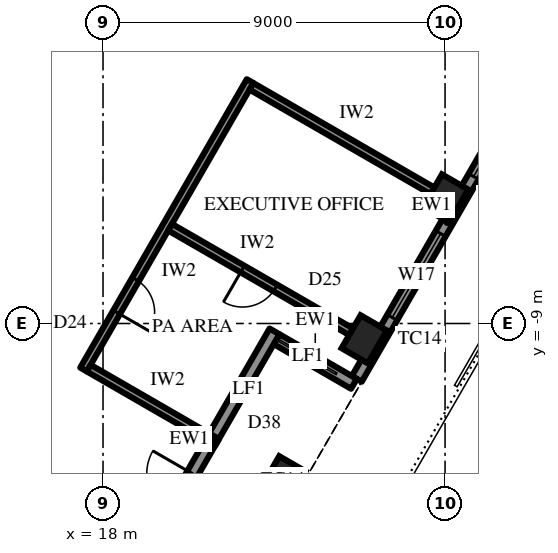
"""IFC4 building model, lengths in metres.
Left out: names, types, materials, properties, quantities, classifications, styles, units other than length and angle.
Written with IfcOpenShell. Run it as: python <this file> out.ifc"""

import sys

from ifc_helpers import new_model, si_unit, direction, frame, frame_2d, origin, origin_2d, place, context, subcontext, project, spatial, rectangle, extrude, element, fill, save


model = new_model("IFC4")
c1 = context("Model", 3, precision=1e-05, world=origin(), true_north=direction((0.0, 1.0)))
c2 = subcontext(c1, "Body", "Model", "MODEL_VIEW")
j1 = project(units=[si_unit("LENGTHUNIT", "METRE"), si_unit("PLANEANGLEUNIT", "RADIAN")], contexts=[c1])
p1 = place(None, origin())
s1 = spatial("IfcSite", under=j1, at=p1, CompositionType="ELEMENT")
p2 = place(p1, origin())
s2 = spatial("IfcBuilding", under=s1, at=p2, CompositionType="ELEMENT")
p3 = place(p2, frame((0.0, 0.0, 332.5)))
s3 = spatial("IfcBuildingStorey", under=s2, at=p3, CompositionType="ELEMENT", Elevation=332.5)
for number, where, z_axis, x_axis in (
    (1, (22.733, -13.125, 0.0), (0.0, 0.0, 1.0), (0.5, 0.866, 0.0)),
    (2, (24.874, -9.417, 0.0), (0.0, 0.0, 1.0), (0.5, 0.866, 0.0)),
    (3, (27.015, -5.708, 0.0), (0.0, 0.0, 1.0), (0.5, 0.866, 0.0)),
):
    element("IfcColumn", number, at=place(p3, frame(where, z_axis=z_axis, x_axis=x_axis)), inside=s3, PredefinedType="COLUMN", context=c2, shape_type="SweptSolid", body=[
        extrude(rectangle(XDim=1.0, YDim=0.8, at=origin_2d()), origin(), (0.0, 0.0, 1.0), 4.2),
    ])
p4 = place(p3, frame((24.677, -10.458, 0.0), z_axis=(0.0, 0.0, 1.0), x_axis=(0.499996453679, 0.866027451244, 0.0)))
e4 = element("IfcWall", 4, at=p4, inside=s3, PredefinedType="SOLIDWALL", context=c2, shape_type="SweptSolid", body=[
    extrude(rectangle(XDim=9.564, YDim=0.3, at=frame_2d((4.782, 0.0))), origin(), (0.0, 0.0, 1.0), 2.9),
])
p5 = place(p4, frame((1.866, 0.0, 0.6)))
e5 = element("IfcOpeningElement", 5, at=p5, cuts=e4, PredefinedType="OPENING", context=c2, shape_type="SweptSolid", body=[
    extrude(rectangle(XDim=2.55, YDim=2.05, at=frame_2d((1.275, 1.025))), frame((0.0, 0.16, 0.0), z_axis=(0.0, -1.0, 0.0), x_axis=(1.0, 0.0, 0.0)), (0.0, 0.0, 1.0), 0.32),
])
p6 = place(p4, frame((6.148, 0.0, 0.6)))
e6 = element("IfcOpeningElement", 6, at=p6, cuts=e4, PredefinedType="OPENING", context=c2, shape_type="SweptSolid", body=[
    extrude(rectangle(XDim=2.55, YDim=2.05, at=frame_2d((1.275, 1.025))), frame((0.0, 0.16, 0.0), z_axis=(0.0, -1.0, 0.0), x_axis=(1.0, 0.0, 0.0)), (0.0, 0.0, 1.0), 0.32),
])
p7 = place(p3, frame((24.602, -10.588, 0.0), z_axis=(0.0, 0.0, 1.0), x_axis=(-0.866016039709, 0.500016218704, 0.0)))
e7 = element("IfcWall", 7, at=p7, inside=s3, PredefinedType="SOLIDWALL", context=c2, shape_type="SweptSolid", body=[
    extrude(rectangle(XDim=2.35, YDim=0.3, at=frame_2d((1.175, 0.0))), origin(), (0.0, 0.0, 1.0), 2.9),
])
p8 = place(p3, frame((19.23, -14.892, 0.0), z_axis=(0.0, 0.0, 1.0), x_axis=(0.499999339774, 0.866025784966, 0.0)))
e8 = element("IfcWall", 8, at=p8, inside=s3, PredefinedType="SOLIDWALL", context=c2, shape_type="SweptSolid", body=[
    extrude(rectangle(XDim=6.564, YDim=0.3, at=frame_2d((3.282, 0.0))), origin(), (0.0, 0.0, 1.0), 2.9),
])
p9 = place(p8, frame((1.041, 0.0, 0.0)))
e9 = element("IfcOpeningElement", 9, at=p9, cuts=e8, PredefinedType="OPENING", context=c2, shape_type="SweptSolid", body=[
    extrude(rectangle(XDim=1.2, YDim=2.4, at=frame_2d((0.6, 1.2))), frame((0.0, 0.16, 0.0), z_axis=(0.0, -1.0, 0.0), x_axis=(1.0, 0.0, 0.0)), (0.0, 0.0, 1.0), 0.32),
])
p10 = place(p3, frame((17.487, -10.212, 0.0), z_axis=(0.0, 0.0, 1.0), x_axis=(0.500006995557, 0.86602136486, 0.0)))
e10 = element("IfcWall", 10, at=p10, inside=s3, PredefinedType="PARTITIONING", context=c2, shape_type="SweptSolid", body=[
    extrude(rectangle(XDim=8.764, YDim=0.2, at=frame_2d((4.382, 0.0))), origin(), (0.0, 0.0, 1.0), 4.0),
])
p11 = place(p10, frame((1.741, 0.0, 0.0)))
e11 = element("IfcOpeningElement", 11, at=p11, cuts=e10, PredefinedType="OPENING", context=c2, shape_type="SweptSolid", body=[
    extrude(rectangle(XDim=1.0, YDim=2.2, at=frame_2d((0.5, 1.1))), frame((0.0, 0.11, 0.0), z_axis=(0.0, -1.0, 0.0), x_axis=(1.0, 0.0, 0.0)), (0.0, 0.0, 1.0), 0.22),
])
p12 = place(p3, frame((17.624, -10.175, 0.0), z_axis=(0.0, 0.0, 1.0), x_axis=(0.86603551244, -0.499982490886, 0.0)))
e12 = element("IfcWall", 12, at=p12, inside=s3, PredefinedType="PARTITIONING", context=c2, shape_type="SweptSolid", body=[
    extrude(rectangle(XDim=3.901, YDim=0.2, at=frame_2d((1.951, 0.0))), origin(), (0.0, 0.0, 1.0), 3.082),
])
p13 = place(p3, frame((19.765, -6.467, 0.0), z_axis=(0.0, 0.0, 1.0), x_axis=(0.866027397988, -0.499996545922, 0.0)))
e13 = element("IfcWall", 13, at=p13, inside=s3, PredefinedType="PARTITIONING", context=c2, shape_type="SweptSolid", body=[
    extrude(rectangle(XDim=5.5, YDim=0.2, at=frame_2d((2.75, 0.0))), origin(), (0.0, 0.0, 1.0), 2.992),
])
p14 = place(p13, frame((2.2, 0.0, 0.0)))
e14 = element("IfcOpeningElement", 14, at=p14, cuts=e13, PredefinedType="OPENING", context=c2, shape_type="SweptSolid", body=[
    extrude(rectangle(XDim=1.0, YDim=2.2, at=frame_2d((0.5, 1.1))), frame((0.0, 0.11, 0.0), z_axis=(0.0, -1.0, 0.0), x_axis=(1.0, 0.0, 0.0)), (0.0, 0.0, 1.0), 0.22),
])
p15 = place(p3, frame((21.906, -2.758, 0.0), z_axis=(0.0, 0.0, 1.0), x_axis=(0.866027397988, -0.499996545922, 0.0)))
e15 = element("IfcWall", 15, at=p15, inside=s3, PredefinedType="PARTITIONING", context=c2, shape_type="SweptSolid", body=[
    extrude(rectangle(XDim=5.5, YDim=0.2, at=frame_2d((2.75, 0.0))), origin(), (0.0, 0.0, 1.0), 3.082),
])
p16 = place(p5, origin())
e16 = element("IfcWindow", 16, at=p16, inside=s3, PartitioningType="SINGLE_PANEL", PredefinedType="WINDOW", context=c2, shape_type="SweptSolid", body=[
    extrude(rectangle(XDim=2.55, YDim=2.05, at=frame_2d((1.275, 1.025))), frame((0.0, 0.03, 0.0), z_axis=(0.0, -1.0, 0.0), x_axis=(1.0, 0.0, 0.0)), (0.0, 0.0, 1.0), 0.06),
])
fill(e5, e16)
p17 = place(p6, origin())
e17 = element("IfcWindow", 17, at=p17, inside=s3, PartitioningType="SINGLE_PANEL", PredefinedType="WINDOW", context=c2, shape_type="SweptSolid", body=[
    extrude(rectangle(XDim=2.55, YDim=2.05, at=frame_2d((1.275, 1.025))), frame((0.0, 0.03, 0.0), z_axis=(0.0, -1.0, 0.0), x_axis=(1.0, 0.0, 0.0)), (0.0, 0.0, 1.0), 0.06),
])
fill(e6, e17)
p18 = place(p11, frame((1.0, 0.0, 0.0), z_axis=(0.0, 0.0, 1.0), x_axis=(-1.0, 0.0, 0.0)))
e18 = element("IfcDoor", 18, at=p18, inside=s3, OperationType="SINGLE_SWING_LEFT", PredefinedType="DOOR", context=c2, shape_type="SweptSolid", body=[
    extrude(rectangle(XDim=1.0, YDim=2.2, at=frame_2d((0.5, 1.1))), frame((0.0, 0.025, 0.0), z_axis=(0.0, -1.0, 0.0), x_axis=(1.0, 0.0, 0.0)), (0.0, 0.0, 1.0), 0.05),
])
fill(e11, e18)
p19 = place(p14, frame((1.0, 0.0, 0.0), z_axis=(0.0, 0.0, 1.0), x_axis=(-1.0, 0.0, 0.0)))
e19 = element("IfcDoor", 19, at=p19, inside=s3, OperationType="SINGLE_SWING_LEFT", PredefinedType="DOOR", context=c2, shape_type="SweptSolid", body=[
    extrude(rectangle(XDim=1.0, YDim=2.2, at=frame_2d((0.5, 1.1))), frame((0.0, 0.025, 0.0), z_axis=(0.0, -1.0, 0.0), x_axis=(1.0, 0.0, 0.0)), (0.0, 0.0, 1.0), 0.05),
])
fill(e14, e19)
save(model, sys.argv[1])
